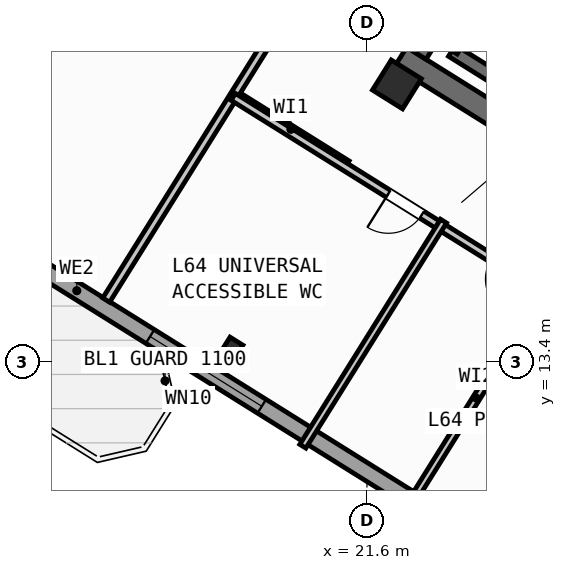
"""IFC4 building model, lengths in metres.
Left out: names, types, materials, properties, quantities, classifications, styles, units other than length and angle.
Written with IfcOpenShell. Run it as: python <this file> out.ifc"""

import sys

from ifc_helpers import new_model, si_unit, direction, frame, frame_2d, origin, origin_2d, place, context, subcontext, project, spatial, rectangle, hollow_rectangle, i_section, extrude, source, transform, mapped, element, fill, save


model = new_model("IFC4")
c1 = context("Model", 3, precision=1e-05, world=origin(), true_north=direction((0.0, 1.0)))
c2 = subcontext(c1, "Body", "Model", "MODEL_VIEW")
j1 = project(units=[si_unit("LENGTHUNIT", "METRE"), si_unit("PLANEANGLEUNIT", "RADIAN")], contexts=[c1])
p1 = place(None, origin())
s1 = spatial("IfcSite", under=j1, at=p1, CompositionType="ELEMENT")
p2 = place(p1, origin())
s2 = spatial("IfcBuilding", under=s1, at=p2, CompositionType="ELEMENT")
p3 = place(p2, frame((0.0, 0.0, 254.7)))
s3 = spatial("IfcBuildingStorey", under=s2, at=p3, CompositionType="ELEMENT", Elevation=254.7)
p4 = place(p3, frame((33.324, 12.503, 0.0), z_axis=(0.0, 0.0, 1.0), x_axis=(-0.848043529849, 0.529926571782, 0.0)))
e1 = element("IfcWall", 1, at=p4, inside=s3, PredefinedType="SHEAR", context=c2, shape_type="SweptSolid", body=[
    extrude(rectangle(XDim=13.04, YDim=0.45, at=frame_2d((6.52, 0.0))), origin(), (0.0, 0.0, 1.0), 4.25),
])
p5 = place(p3, frame((26.007, 24.976, 0.0), z_axis=(0.0, 0.0, 1.0), x_axis=(-0.529931155655, -0.848040665456, 0.0)))
e2 = element("IfcWall", 2, at=p5, inside=s3, PredefinedType="SHEAR", context=c2, shape_type="SweptSolid", body=[
    extrude(rectangle(XDim=6.475, YDim=0.45, at=frame_2d((3.238, 0.0))), origin(), (0.0, 0.0, 1.0), 4.25),
])
m1 = source(origin(), c2, "Body", "SweptSolid", [
    extrude(hollow_rectangle(XDim=0.7, YDim=0.7, WallThickness=0.028, at=origin_2d()), origin(), (0.0, 0.0, 1.0), 4.5),
])
p6 = place(p3, frame((22.191, 18.87, 0.0), z_axis=(0.0, 0.0, 1.0), x_axis=(-0.848048096156, 0.529919264233, 0.0)))
e3 = element("IfcColumn", 3, at=p6, inside=s3, PredefinedType="COLUMN", context=c2, shape_type="MappedRepresentation", body=[
    mapped(m1, transform((0.0, 0.0, 0.0), scale=1.0)),
])
m2 = source(origin(), c2, "Body", "SweptSolid", [
    extrude(i_section(OverallWidth=0.3, OverallDepth=0.45, WebThickness=0.014, FlangeThickness=0.026, at=origin_2d()), origin(), (0.0, 0.0, 1.0), 4.5),
])
p7 = place(p3, frame((18.906, 13.612, 0.0), z_axis=(0.0, 0.0, 1.0), x_axis=(-0.848048096156, 0.529919264233, 0.0)))
e4 = element("IfcColumn", 4, at=p7, inside=s3, PredefinedType="COLUMN", context=c2, shape_type="MappedRepresentation", body=[
    mapped(m2, transform((0.0, 0.0, 0.0), scale=1.0)),
])
p8 = place(p3, frame((29.268, 6.429, 0.0), z_axis=(0.0, 0.0, 1.0), x_axis=(-0.848049971435, 0.529916263149, 0.0)))
e5 = element("IfcWall", 5, at=p8, inside=s3, PredefinedType="STANDARD", context=c2, shape_type="SweptSolid", body=[
    extrude(rectangle(XDim=31.588, YDim=0.32, at=frame_2d((15.794, 0.0))), origin(), (0.0, 0.0, 1.0), 4.25),
])
p9 = place(p8, frame((22.349, 0.0, 0.0)))
e6 = element("IfcOpeningElement", 6, at=p9, cuts=e5, PredefinedType="OPENING", context=c2, shape_type="SweptSolid", body=[
    extrude(rectangle(XDim=1.2, YDim=2.15, at=frame_2d((0.6, 1.075))), frame((0.0, 0.17, 0.0), z_axis=(0.0, -1.0, 0.0), x_axis=(1.0, 0.0, 0.0)), (0.0, 0.0, 1.0), 0.34),
])
p10 = place(p8, frame((11.489, 0.0, 0.7)))
e7 = element("IfcOpeningElement", 7, at=p10, cuts=e5, PredefinedType="OPENING", context=c2, shape_type="SweptSolid", body=[
    extrude(rectangle(XDim=2.6, YDim=2.0, at=frame_2d((1.3, 1.0))), frame((0.0, 0.17, 0.0), z_axis=(0.0, -1.0, 0.0), x_axis=(1.0, 0.0, 0.0)), (0.0, 0.0, 1.0), 0.34),
])
p11 = place(p8, frame((17.881, 0.0, 0.75)))
e8 = element("IfcOpeningElement", 8, at=p11, cuts=e5, PredefinedType="OPENING", context=c2, shape_type="SweptSolid", body=[
    extrude(rectangle(XDim=2.0, YDim=1.95, at=frame_2d((1.0, 0.975))), frame((0.0, 0.17, 0.0), z_axis=(0.0, -1.0, 0.0), x_axis=(1.0, 0.0, 0.0)), (0.0, 0.0, 1.0), 0.34),
])
p12 = place(p8, frame((25.501, 0.0, 0.85)))
e9 = element("IfcOpeningElement", 9, at=p12, cuts=e5, PredefinedType="OPENING", context=c2, shape_type="SweptSolid", body=[
    extrude(rectangle(XDim=1.6, YDim=1.8, at=frame_2d((0.8, 0.9))), frame((0.0, 0.17, 0.0), z_axis=(0.0, -1.0, 0.0), x_axis=(1.0, 0.0, 0.0)), (0.0, 0.0, 1.0), 0.34),
])
p13 = place(p8, frame((28.725, 0.0, 0.85)))
e10 = element("IfcOpeningElement", 10, at=p13, cuts=e5, PredefinedType="OPENING", context=c2, shape_type="SweptSolid", body=[
    extrude(rectangle(XDim=1.6, YDim=1.8, at=frame_2d((0.8, 0.9))), frame((0.0, 0.17, 0.0), z_axis=(0.0, -1.0, 0.0), x_axis=(1.0, 0.0, 0.0)), (0.0, 0.0, 1.0), 0.34),
])
p14 = place(p3, frame((29.605, 15.581, 0.0), z_axis=(0.0, 0.0, 1.0), x_axis=(-0.848036911448, 0.529937163087, 0.0)))
e11 = element("IfcWall", 11, at=p14, inside=s3, PredefinedType="SHEAR", context=c2, shape_type="SweptSolid", body=[
    extrude(rectangle(XDim=7.46, YDim=0.26, at=frame_2d((3.73, 0.0))), origin(), (0.0, 0.0, 1.0), 4.25),
])
p15 = place(p3, frame((24.945, 22.22, 0.0), z_axis=(0.0, 0.0, 1.0), x_axis=(-0.529908658664, -0.84805472316, 0.0)))
e12 = element("IfcWall", 12, at=p15, inside=s3, PredefinedType="SHEAR", context=c2, shape_type="SweptSolid", body=[
    extrude(rectangle(XDim=3.16, YDim=0.26, at=frame_2d((1.58, 0.0))), origin(), (0.0, 0.0, 1.0), 4.25),
])
p16 = place(p3, frame((21.206, 17.292, 0.0), z_axis=(0.0, 0.0, 1.0), x_axis=(-0.848050851465, 0.529914854792, 0.0)))
e13 = element("IfcWall", 13, at=p16, inside=s3, PredefinedType="PARTITIONING", context=c2, shape_type="SweptSolid", body=[
    extrude(rectangle(XDim=2.61, YDim=0.16, at=frame_2d((1.305, 0.0))), origin(), (0.0, 0.0, 1.0), 4.24),
])
p17 = place(p3, frame((20.719, 21.44, 0.0), z_axis=(0.0, 0.0, 1.0), x_axis=(-0.529906246318, -0.848056230514, 0.0)))
e14 = element("IfcWall", 14, at=p17, inside=s3, PredefinedType="PARTITIONING", context=c2, shape_type="SweptSolid", body=[
    extrude(rectangle(XDim=8.05, YDim=0.16, at=frame_2d((4.025, 0.0))), origin(), (0.0, 0.0, 1.0), 4.24),
])
p18 = place(p3, frame((32.164, 10.374, 0.0), z_axis=(0.0, 0.0, 1.0), x_axis=(-0.848044107957, 0.529925646633, 0.0)))
e15 = element("IfcWall", 15, at=p18, inside=s3, PredefinedType="PARTITIONING", context=c2, shape_type="SweptSolid", body=[
    extrude(rectangle(XDim=15.57, YDim=0.16, at=frame_2d((7.785, 0.0))), origin(), (0.0, 0.0, 1.0), 4.24),
])
p19 = place(p18, frame((0.85, 0.0, 0.0)))
e16 = element("IfcOpeningElement", 16, at=p19, cuts=e15, PredefinedType="OPENING", context=c2, shape_type="SweptSolid", body=[
    extrude(rectangle(XDim=0.86, YDim=2.05, at=frame_2d((0.43, 1.025))), frame((0.0, 0.09, 0.0), z_axis=(0.0, -1.0, 0.0), x_axis=(1.0, 0.0, 0.0)), (0.0, 0.0, 1.0), 0.18),
])
p20 = place(p18, frame((3.87, 0.0, 0.0)))
e17 = element("IfcOpeningElement", 17, at=p20, cuts=e15, PredefinedType="OPENING", context=c2, shape_type="SweptSolid", body=[
    extrude(rectangle(XDim=0.86, YDim=2.05, at=frame_2d((0.43, 1.025))), frame((0.0, 0.09, 0.0), z_axis=(0.0, -1.0, 0.0), x_axis=(1.0, 0.0, 0.0)), (0.0, 0.0, 1.0), 0.18),
])
p21 = place(p18, frame((6.33, 0.0, 0.0)))
e18 = element("IfcOpeningElement", 18, at=p21, cuts=e15, PredefinedType="OPENING", context=c2, shape_type="SweptSolid", body=[
    extrude(rectangle(XDim=0.78, YDim=2.05, at=frame_2d((0.39, 1.025))), frame((0.0, 0.09, 0.0), z_axis=(0.0, -1.0, 0.0), x_axis=(1.0, 0.0, 0.0)), (0.0, 0.0, 1.0), 0.18),
])
p22 = place(p18, frame((8.78, 0.0, 0.0)))
e19 = element("IfcOpeningElement", 19, at=p22, cuts=e15, PredefinedType="OPENING", context=c2, shape_type="SweptSolid", body=[
    extrude(rectangle(XDim=0.78, YDim=2.05, at=frame_2d((0.39, 1.025))), frame((0.0, 0.09, 0.0), z_axis=(0.0, -1.0, 0.0), x_axis=(1.0, 0.0, 0.0)), (0.0, 0.0, 1.0), 0.18),
])
p23 = place(p18, frame((11.18, 0.0, 0.0)))
e20 = element("IfcOpeningElement", 20, at=p23, cuts=e15, PredefinedType="OPENING", context=c2, shape_type="SweptSolid", body=[
    extrude(rectangle(XDim=0.78, YDim=2.05, at=frame_2d((0.39, 1.025))), frame((0.0, 0.09, 0.0), z_axis=(0.0, -1.0, 0.0), x_axis=(1.0, 0.0, 0.0)), (0.0, 0.0, 1.0), 0.18),
])
for number, where, z_axis, x_axis in (
    (21, (25.147, 14.9, 0.0), (0.0, 0.0, 1.0), (-0.53, -0.848, 0.0)),
    (22, (23.111, 16.172, 0.0), (0.0, 0.0, 1.0), (-0.53, -0.848, 0.0)),
):
    element("IfcWall", number, at=place(p3, frame(where, z_axis=z_axis, x_axis=x_axis)), inside=s3, PredefinedType="PLUMBINGWALL", context=c2, shape_type="SweptSolid", body=[
        extrude(rectangle(XDim=5.24, YDim=0.14, at=frame_2d((2.62, 0.0))), origin(), (0.0, 0.0, 1.0), 4.24),
    ])
m3 = source(origin(), c2, "Body", "SweptSolid", [
    extrude(rectangle(XDim=2.6, YDim=2.0, at=frame_2d((1.3, 1.0))), frame((0.0, 0.03, 0.0), z_axis=(0.0, -1.0, 0.0), x_axis=(1.0, 0.0, 0.0)), (0.0, 0.0, 1.0), 0.06),
])
p24 = place(p10, origin())
e23 = element("IfcWindow", 23, at=p24, inside=s3, PartitioningType="SINGLE_PANEL", PredefinedType="WINDOW", context=c2, shape_type="MappedRepresentation", body=[
    mapped(m3, transform((0.0, 0.0, 0.0), scale=1.0)),
])
fill(e7, e23)
m4 = source(origin(), c2, "Body", "SweptSolid", [
    extrude(rectangle(XDim=0.78, YDim=2.05, at=frame_2d((0.39, 1.025))), frame((0.0, 0.025, 0.0), z_axis=(0.0, -1.0, 0.0), x_axis=(1.0, 0.0, 0.0)), (0.0, 0.0, 1.0), 0.05),
])
p25 = place(p23, origin())
e24 = element("IfcDoor", 24, at=p25, inside=s3, OperationType="SINGLE_SWING_RIGHT", PredefinedType="DOOR", context=c2, shape_type="MappedRepresentation", body=[
    mapped(m4, transform((0.0, 0.0, 0.0), scale=1.0)),
])
fill(e20, e24)
save(model, sys.argv[1])
